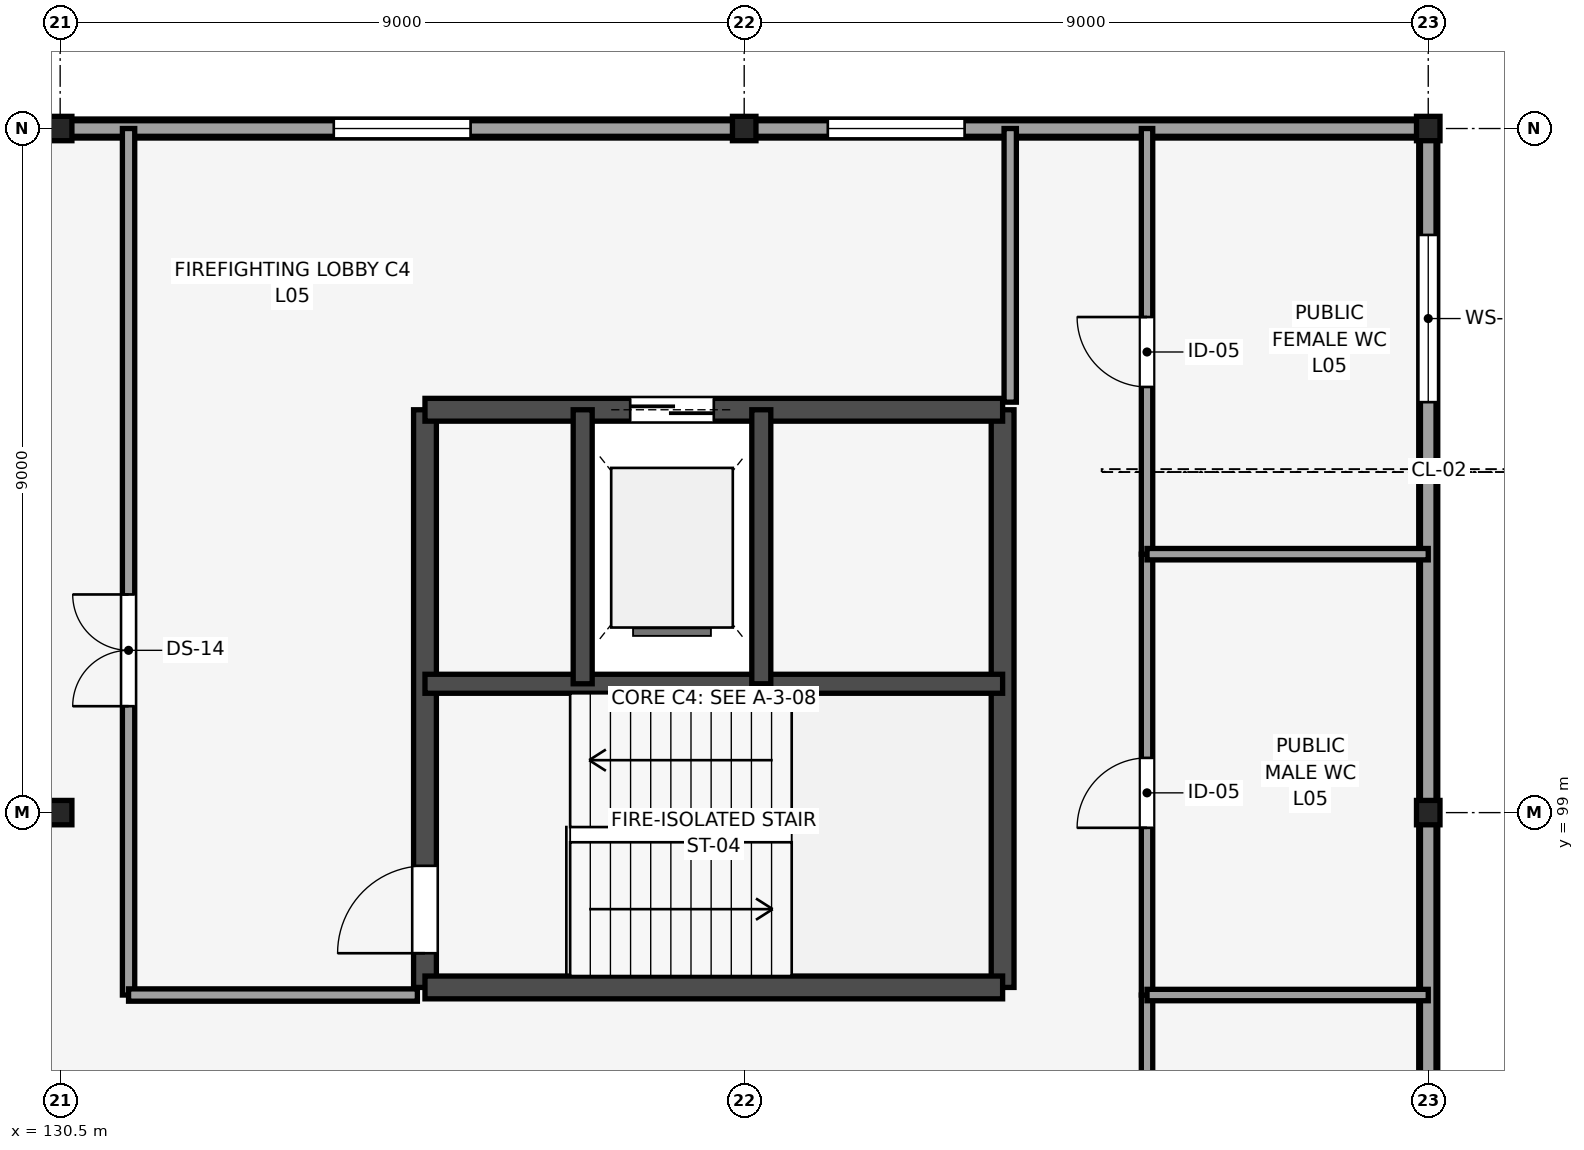
"""IFC4 building model, lengths in metres.
Left out: names, types, materials, properties, quantities, classifications, styles, units other than length and angle.
Written with IfcOpenShell. Run it as: python <this file> out.ifc"""

import sys

from ifc_helpers import new_model, si_unit, direction, frame, frame_2d, origin, origin_2d, place, context, subcontext, project, spatial, rectangle, i_section, extrude, element, fill, save


model = new_model("IFC4")
c1 = context("Model", 3, precision=1e-05, world=origin(), true_north=direction((0.0, 1.0)))
c2 = subcontext(c1, "Body", "Model", "MODEL_VIEW")
j1 = project(units=[si_unit("LENGTHUNIT", "METRE"), si_unit("PLANEANGLEUNIT", "RADIAN")], contexts=[c1])
p1 = place(None, origin())
s1 = spatial("IfcSite", under=j1, at=p1, CompositionType="ELEMENT")
p2 = place(p1, origin())
s2 = spatial("IfcBuilding", under=s1, at=p2, CompositionType="ELEMENT")
p3 = place(p2, frame((0.0, 0.0, 23.4)))
s3 = spatial("IfcBuildingStorey", under=s2, at=p3, CompositionType="ELEMENT", Elevation=23.4)
for number, where, z_axis, x_axis in (
    (1, (130.5, 99.0, 0.0), (0.0, 0.0, 1.0), (1.0, 0.0, 0.0)),
    (2, (130.5, 108.0, 0.0), (0.0, 0.0, 1.0), (1.0, 0.0, 0.0)),
    (3, (139.5, 108.0, 0.0), (0.0, 0.0, 1.0), (1.0, 0.0, 0.0)),
    (4, (148.5, 99.0, 0.0), (0.0, 0.0, 1.0), (1.0, 0.0, 0.0)),
    (5, (148.5, 108.0, 0.0), (0.0, 0.0, 1.0), (1.0, 0.0, 0.0)),
):
    element("IfcColumn", number, at=place(p3, frame(where, z_axis=z_axis, x_axis=x_axis)), inside=s3, PredefinedType="COLUMN", context=c2, shape_type="SweptSolid", body=[
        extrude(i_section(OverallWidth=0.309, OverallDepth=0.321, WebThickness=0.014, FlangeThickness=0.022, FilletRadius=0.017, at=origin_2d()), origin(), (0.0, 0.0, 1.0), 2.55),
    ])
p4 = place(p3, frame((135.3, 96.7, 0.0), z_axis=(0.0, 0.0, 1.0), x_axis=(0.0, 1.0, 0.0)))
e6 = element("IfcWall", 6, at=p4, inside=s3, PredefinedType="SHEAR", context=c2, shape_type="SweptSolid", body=[
    extrude(rectangle(XDim=7.6, YDim=0.3, at=frame_2d((3.8, 0.0))), origin(), (0.0, 0.0, 1.0), 2.39),
])
p5 = place(p4, frame((0.45, 0.0, 0.0)))
e7 = element("IfcOpeningElement", 7, at=p5, cuts=e6, PredefinedType="OPENING", context=c2, shape_type="SweptSolid", body=[
    extrude(rectangle(XDim=1.15, YDim=2.15, at=frame_2d((0.575, 1.075))), frame((0.0, 0.16, 0.0), z_axis=(0.0, -1.0, 0.0), x_axis=(1.0, 0.0, 0.0)), (0.0, 0.0, 1.0), 0.32),
])
p6 = place(p3, frame((142.9, 96.7, 0.0), z_axis=(0.0, 0.0, 1.0), x_axis=(0.0, 1.0, 0.0)))
e8 = element("IfcWall", 8, at=p6, inside=s3, PredefinedType="SHEAR", context=c2, shape_type="SweptSolid", body=[
    extrude(rectangle(XDim=7.6, YDim=0.3, at=frame_2d((3.8, 0.0))), origin(), (0.0, 0.0, 1.0), 2.39),
])
p7 = place(p3, frame((135.3, 96.7, 0.0), z_axis=(0.0, 0.0, 1.0), x_axis=(1.0, 0.0, 0.0)))
e9 = element("IfcWall", 9, at=p7, inside=s3, PredefinedType="SHEAR", context=c2, shape_type="SweptSolid", body=[
    extrude(rectangle(XDim=7.6, YDim=0.3, at=frame_2d((3.8, 0.0))), origin(), (0.0, 0.0, 1.0), 2.39),
])
p8 = place(p3, frame((135.3, 104.3, 0.0), z_axis=(0.0, 0.0, 1.0), x_axis=(1.0, 0.0, 0.0)))
e10 = element("IfcWall", 10, at=p8, inside=s3, PredefinedType="SHEAR", context=c2, shape_type="SweptSolid", body=[
    extrude(rectangle(XDim=7.6, YDim=0.3, at=frame_2d((3.8, 0.0))), origin(), (0.0, 0.0, 1.0), 2.39),
])
p9 = place(p8, frame((2.7, 0.0, 0.0)))
e11 = element("IfcOpeningElement", 11, at=p9, cuts=e10, PredefinedType="OPENING", context=c2, shape_type="SweptSolid", body=[
    extrude(rectangle(XDim=1.1, YDim=2.2, at=frame_2d((0.55, 1.1))), frame((0.0, 0.16, 0.0), z_axis=(0.0, -1.0, 0.0), x_axis=(1.0, 0.0, 0.0)), (0.0, 0.0, 1.0), 0.32),
])
p10 = place(p3, frame((135.3, 100.695, 0.0), z_axis=(0.0, 0.0, 1.0), x_axis=(1.0, 0.0, 0.0)))
e12 = element("IfcWall", 12, at=p10, inside=s3, PredefinedType="SHEAR", context=c2, shape_type="SweptSolid", body=[
    extrude(rectangle(XDim=7.6, YDim=0.25, at=frame_2d((3.8, 0.0))), origin(), (0.0, 0.0, 1.0), 2.39),
])
for number, where, z_axis, x_axis in (
    (13, (137.375, 100.695, 0.0), (0.0, 0.0, 1.0), (0.0, 1.0, 0.0)),
    (14, (139.725, 100.695, 0.0), (0.0, 0.0, 1.0), (0.0, 1.0, 0.0)),
):
    element("IfcWall", number, at=place(p3, frame(where, z_axis=z_axis, x_axis=x_axis)), inside=s3, PredefinedType="SHEAR", context=c2, shape_type="SweptSolid", body=[
        extrude(rectangle(XDim=3.605, YDim=0.25, at=frame_2d((1.802, 0.0))), origin(), (0.0, 0.0, 1.0), 2.39),
    ])
p11 = place(p3, frame((148.5, 90.0, 0.0), z_axis=(0.0, 0.0, 1.0), x_axis=(0.0, 1.0, 0.0)))
e15 = element("IfcWall", 15, at=p11, inside=s3, PredefinedType="STANDARD", context=c2, shape_type="SweptSolid", body=[
    extrude(rectangle(XDim=9.0, YDim=0.25, at=frame_2d((4.5, 0.0))), origin(), (0.0, 0.0, 1.0), 2.114),
])
p12 = place(p11, frame((0.9, 0.0, 0.35)))
e16 = element("IfcOpeningElement", 16, at=p12, cuts=e15, PredefinedType="OPENING", context=c2, shape_type="SweptSolid", body=[
    extrude(rectangle(XDim=1.8, YDim=1.5, at=frame_2d((0.9, 0.75))), frame((0.0, 0.135, 0.0), z_axis=(0.0, -1.0, 0.0), x_axis=(1.0, 0.0, 0.0)), (0.0, 0.0, 1.0), 0.27),
])
p13 = place(p3, frame((148.5, 99.0, 0.0), z_axis=(0.0, 0.0, 1.0), x_axis=(0.0, 1.0, 0.0)))
e17 = element("IfcWall", 17, at=p13, inside=s3, PredefinedType="STANDARD", context=c2, shape_type="SweptSolid", body=[
    extrude(rectangle(XDim=9.0, YDim=0.25, at=frame_2d((4.5, 0.0))), origin(), (0.0, 0.0, 1.0), 2.114),
])
p14 = place(p13, frame((5.4, 0.0, 0.3)))
e18 = element("IfcOpeningElement", 18, at=p14, cuts=e17, PredefinedType="OPENING", context=c2, shape_type="SweptSolid", body=[
    extrude(rectangle(XDim=2.2, YDim=1.3, at=frame_2d((1.1, 0.65))), frame((0.0, 0.135, 0.0), z_axis=(0.0, -1.0, 0.0), x_axis=(1.0, 0.0, 0.0)), (0.0, 0.0, 1.0), 0.27),
])
p15 = place(p3, frame((130.5, 108.0, 0.0), z_axis=(0.0, 0.0, 1.0), x_axis=(-1.0, 0.0, 0.0)))
e19 = element("IfcWall", 19, at=p15, inside=s3, PredefinedType="STANDARD", context=c2, shape_type="SweptSolid", body=[
    extrude(rectangle(XDim=9.0, YDim=0.25, at=frame_2d((4.5, 0.0))), origin(), (0.0, 0.0, 1.0), 2.114),
])
p16 = place(p3, frame((139.5, 108.0, 0.0), z_axis=(0.0, 0.0, 1.0), x_axis=(-1.0, 0.0, 0.0)))
e20 = element("IfcWall", 20, at=p16, inside=s3, PredefinedType="STANDARD", context=c2, shape_type="SweptSolid", body=[
    extrude(rectangle(XDim=9.0, YDim=0.25, at=frame_2d((4.5, 0.0))), origin(), (0.0, 0.0, 1.0), 2.114),
])
p17 = place(p16, frame((3.6, 0.0, 0.35)))
e21 = element("IfcOpeningElement", 21, at=p17, cuts=e20, PredefinedType="OPENING", context=c2, shape_type="SweptSolid", body=[
    extrude(rectangle(XDim=1.8, YDim=1.5, at=frame_2d((0.9, 0.75))), frame((0.0, 0.135, 0.0), z_axis=(0.0, -1.0, 0.0), x_axis=(1.0, 0.0, 0.0)), (0.0, 0.0, 1.0), 0.27),
])
p18 = place(p3, frame((148.5, 108.0, 0.0), z_axis=(0.0, 0.0, 1.0), x_axis=(-1.0, 0.0, 0.0)))
e22 = element("IfcWall", 22, at=p18, inside=s3, PredefinedType="STANDARD", context=c2, shape_type="SweptSolid", body=[
    extrude(rectangle(XDim=9.0, YDim=0.25, at=frame_2d((4.5, 0.0))), origin(), (0.0, 0.0, 1.0), 2.114),
])
p19 = place(p18, frame((6.1, 0.0, 0.35)))
e23 = element("IfcOpeningElement", 23, at=p19, cuts=e22, PredefinedType="OPENING", context=c2, shape_type="SweptSolid", body=[
    extrude(rectangle(XDim=1.8, YDim=1.5, at=frame_2d((0.9, 0.75))), frame((0.0, 0.135, 0.0), z_axis=(0.0, -1.0, 0.0), x_axis=(1.0, 0.0, 0.0)), (0.0, 0.0, 1.0), 0.27),
])
p20 = place(p3, frame((112.5, 108.0, 2.55), z_axis=(0.0, 0.0, 1.0), x_axis=(1.0, 0.0, 0.0)))
e24 = element("IfcWall", 24, at=p20, inside=s3, PredefinedType="PARAPET", context=c2, shape_type="SweptSolid", body=[
    extrude(rectangle(XDim=36.0, YDim=0.205, at=frame_2d((18.0, 0.0))), origin(), (0.0, 0.0, 1.0), 0.4),
])
p21 = place(p3, frame((148.5, 90.0, 2.55), z_axis=(0.0, 0.0, 1.0), x_axis=(0.0, 1.0, 0.0)))
e25 = element("IfcWall", 25, at=p21, inside=s3, PredefinedType="PARAPET", context=c2, shape_type="SweptSolid", body=[
    extrude(rectangle(XDim=18.0, YDim=0.205, at=frame_2d((9.0, 0.0))), origin(), (0.0, 0.0, 1.0), 0.4),
])
p22 = place(p3, frame((131.4, 96.6, 0.0), z_axis=(0.0, 0.0, 1.0), x_axis=(0.0, 1.0, 0.0)))
e26 = element("IfcWall", 26, at=p22, inside=s3, PredefinedType="PARTITIONING", context=c2, shape_type="SweptSolid", body=[
    extrude(rectangle(XDim=11.4, YDim=0.162, at=frame_2d((5.7, 0.0))), origin(), (0.0, 0.0, 1.0), 2.24),
])
p23 = place(p22, frame((3.8, 0.0, 0.0)))
e27 = element("IfcOpeningElement", 27, at=p23, cuts=e26, PredefinedType="OPENING", context=c2, shape_type="SweptSolid", body=[
    extrude(rectangle(XDim=1.47, YDim=2.2, at=frame_2d((0.735, 1.1))), frame((0.0, 0.091, 0.0), z_axis=(0.0, -1.0, 0.0), x_axis=(1.0, 0.0, 0.0)), (0.0, 0.0, 1.0), 0.182),
])
p24 = place(p3, frame((131.4, 96.6, 0.0), z_axis=(0.0, 0.0, 1.0), x_axis=(1.0, 0.0, 0.0)))
e28 = element("IfcWall", 28, at=p24, inside=s3, PredefinedType="PARTITIONING", context=c2, shape_type="SweptSolid", body=[
    extrude(rectangle(XDim=3.8, YDim=0.162, at=frame_2d((1.9, 0.0))), origin(), (0.0, 0.0, 1.0), 2.24),
])
p25 = place(p3, frame((143.0, 104.4, 0.0), z_axis=(0.0, 0.0, 1.0), x_axis=(0.0, 1.0, 0.0)))
e29 = element("IfcWall", 29, at=p25, inside=s3, PredefinedType="PARTITIONING", context=c2, shape_type="SweptSolid", body=[
    extrude(rectangle(XDim=3.6, YDim=0.162, at=frame_2d((1.8, 0.0))), origin(), (0.0, 0.0, 1.0), 2.24),
])
p26 = place(p3, frame((144.8, 94.4, 0.0), z_axis=(0.0, 0.0, 1.0), x_axis=(0.0, 1.0, 0.0)))
e30 = element("IfcWall", 30, at=p26, inside=s3, PredefinedType="PARTITIONING", context=c2, shape_type="SweptSolid", body=[
    extrude(rectangle(XDim=2.2, YDim=0.15, at=frame_2d((1.1, 0.0))), origin(), (0.0, 0.0, 1.0), 2.24),
])
p27 = place(p3, frame((144.8, 96.6, 0.0), z_axis=(0.0, 0.0, 1.0), x_axis=(0.0, 1.0, 0.0)))
e31 = element("IfcWall", 31, at=p27, inside=s3, PredefinedType="PARTITIONING", context=c2, shape_type="SweptSolid", body=[
    extrude(rectangle(XDim=5.8, YDim=0.15, at=frame_2d((2.9, 0.0))), origin(), (0.0, 0.0, 1.0), 2.24),
])
p28 = place(p27, frame((2.2, 0.0, 0.0)))
e32 = element("IfcOpeningElement", 32, at=p28, cuts=e31, PredefinedType="OPENING", context=c2, shape_type="SweptSolid", body=[
    extrude(rectangle(XDim=0.92, YDim=2.15, at=frame_2d((0.46, 1.075))), frame((0.0, 0.085, 0.0), z_axis=(0.0, -1.0, 0.0), x_axis=(1.0, 0.0, 0.0)), (0.0, 0.0, 1.0), 0.17),
])
p29 = place(p3, frame((144.8, 102.4, 0.0), z_axis=(0.0, 0.0, 1.0), x_axis=(0.0, 1.0, 0.0)))
e33 = element("IfcWall", 33, at=p29, inside=s3, PredefinedType="PARTITIONING", context=c2, shape_type="SweptSolid", body=[
    extrude(rectangle(XDim=5.6, YDim=0.15, at=frame_2d((2.8, 0.0))), origin(), (0.0, 0.0, 1.0), 2.24),
])
p30 = place(p29, frame((2.2, 0.0, 0.0)))
e34 = element("IfcOpeningElement", 34, at=p30, cuts=e33, PredefinedType="OPENING", context=c2, shape_type="SweptSolid", body=[
    extrude(rectangle(XDim=0.92, YDim=2.15, at=frame_2d((0.46, 1.075))), frame((0.0, 0.085, 0.0), z_axis=(0.0, -1.0, 0.0), x_axis=(1.0, 0.0, 0.0)), (0.0, 0.0, 1.0), 0.17),
])
for number, where, z_axis, x_axis in (
    (35, (144.8, 96.6, 0.0), (0.0, 0.0, 1.0), (1.0, 0.0, 0.0)),
    (36, (144.8, 102.4, 0.0), (0.0, 0.0, 1.0), (1.0, 0.0, 0.0)),
):
    element("IfcWall", number, at=place(p3, frame(where, z_axis=z_axis, x_axis=x_axis)), inside=s3, PredefinedType="PARTITIONING", context=c2, shape_type="SweptSolid", body=[
        extrude(rectangle(XDim=3.7, YDim=0.15, at=frame_2d((1.85, 0.0))), origin(), (0.0, 0.0, 1.0), 2.24),
    ])
p31 = place(p17, origin())
e37 = element("IfcWindow", 37, at=p31, inside=s3, PartitioningType="SINGLE_PANEL", PredefinedType="WINDOW", context=c2, shape_type="SweptSolid", body=[
    extrude(rectangle(XDim=1.8, YDim=1.5, at=frame_2d((0.9, 0.75))), frame((0.0, 0.03, 0.0), z_axis=(0.0, -1.0, 0.0), x_axis=(1.0, 0.0, 0.0)), (0.0, 0.0, 1.0), 0.06),
])
fill(e21, e37)
p32 = place(p19, origin())
e38 = element("IfcWindow", 38, at=p32, inside=s3, PartitioningType="SINGLE_PANEL", PredefinedType="WINDOW", context=c2, shape_type="SweptSolid", body=[
    extrude(rectangle(XDim=1.8, YDim=1.5, at=frame_2d((0.9, 0.75))), frame((0.0, 0.03, 0.0), z_axis=(0.0, -1.0, 0.0), x_axis=(1.0, 0.0, 0.0)), (0.0, 0.0, 1.0), 0.06),
])
fill(e23, e38)
p33 = place(p14, origin())
e39 = element("IfcWindow", 39, at=p33, inside=s3, PartitioningType="SINGLE_PANEL", PredefinedType="WINDOW", context=c2, shape_type="SweptSolid", body=[
    extrude(rectangle(XDim=2.2, YDim=1.3, at=frame_2d((1.1, 0.65))), frame((0.0, 0.03, 0.0), z_axis=(0.0, -1.0, 0.0), x_axis=(1.0, 0.0, 0.0)), (0.0, 0.0, 1.0), 0.06),
])
fill(e18, e39)
p34 = place(p5, origin())
e40 = element("IfcDoor", 40, at=p34, inside=s3, OperationType="SINGLE_SWING_LEFT", PredefinedType="DOOR", context=c2, shape_type="SweptSolid", body=[
    extrude(rectangle(XDim=1.15, YDim=2.15, at=frame_2d((0.575, 1.075))), frame((0.0, 0.025, 0.0), z_axis=(0.0, -1.0, 0.0), x_axis=(1.0, 0.0, 0.0)), (0.0, 0.0, 1.0), 0.05),
])
fill(e7, e40)
p35 = place(p9, origin())
e41 = element("IfcDoor", 41, at=p35, inside=s3, OperationType="DOUBLE_DOOR_SLIDING", PredefinedType="DOOR", context=c2, shape_type="SweptSolid", body=[
    extrude(rectangle(XDim=1.1, YDim=2.2, at=frame_2d((0.55, 1.1))), frame((0.0, 0.025, 0.0), z_axis=(0.0, -1.0, 0.0), x_axis=(1.0, 0.0, 0.0)), (0.0, 0.0, 1.0), 0.05),
])
fill(e11, e41)
p36 = place(p23, origin())
e42 = element("IfcDoor", 42, at=p36, inside=s3, OperationType="DOUBLE_DOOR_SINGLE_SWING", PredefinedType="DOOR", context=c2, shape_type="SweptSolid", body=[
    extrude(rectangle(XDim=1.47, YDim=2.2, at=frame_2d((0.735, 1.1))), frame((0.0, 0.025, 0.0), z_axis=(0.0, -1.0, 0.0), x_axis=(1.0, 0.0, 0.0)), (0.0, 0.0, 1.0), 0.05),
])
fill(e27, e42)
p37 = place(p28, origin())
e43 = element("IfcDoor", 43, at=p37, inside=s3, OperationType="SINGLE_SWING_LEFT", PredefinedType="DOOR", context=c2, shape_type="SweptSolid", body=[
    extrude(rectangle(XDim=0.92, YDim=2.15, at=frame_2d((0.46, 1.075))), frame((0.0, 0.025, 0.0), z_axis=(0.0, -1.0, 0.0), x_axis=(1.0, 0.0, 0.0)), (0.0, 0.0, 1.0), 0.05),
])
fill(e32, e43)
p38 = place(p30, origin())
e44 = element("IfcDoor", 44, at=p38, inside=s3, OperationType="SINGLE_SWING_RIGHT", PredefinedType="DOOR", context=c2, shape_type="SweptSolid", body=[
    extrude(rectangle(XDim=0.92, YDim=2.15, at=frame_2d((0.46, 1.075))), frame((0.0, 0.025, 0.0), z_axis=(0.0, -1.0, 0.0), x_axis=(1.0, 0.0, 0.0)), (0.0, 0.0, 1.0), 0.05),
])
fill(e34, e44)
save(model, sys.argv[1])
